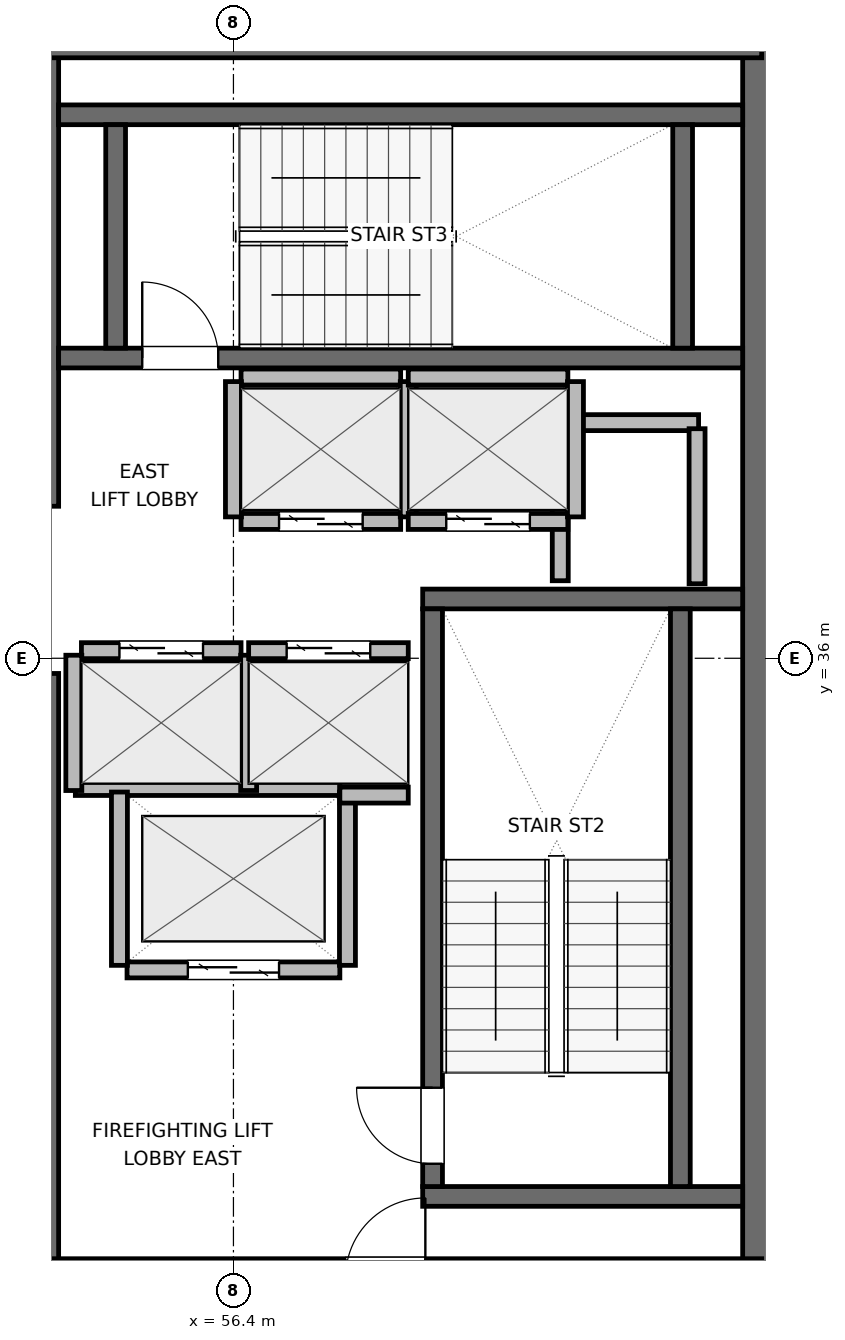
"""IFC4 building model, lengths in metres.
Left out: names, types, materials, properties, quantities, classifications, styles, units other than length and angle.
Written with IfcOpenShell. Run it as: python <this file> out.ifc"""

import sys

from ifc_helpers import new_model, si_unit, direction, frame, frame_2d, origin, place, context, subcontext, project, spatial, rectangle, extrude, element, fill, save


model = new_model("IFC4")
c1 = context("Model", 3, precision=1e-05, world=origin(), true_north=direction((0.0, 1.0)))
c2 = subcontext(c1, "Body", "Model", "MODEL_VIEW")
j1 = project(units=[si_unit("LENGTHUNIT", "METRE"), si_unit("PLANEANGLEUNIT", "RADIAN")], contexts=[c1])
p1 = place(None, origin())
s1 = spatial("IfcSite", under=j1, at=p1, CompositionType="ELEMENT")
p2 = place(p1, origin())
s2 = spatial("IfcBuilding", under=s1, at=p2, CompositionType="ELEMENT")
p3 = place(p2, frame((0.0, 0.0, 274.5)))
s3 = spatial("IfcBuildingStorey", under=s2, at=p3, CompositionType="ELEMENT", Elevation=274.5)
p4 = place(p3, frame((53.85, 27.85, 0.0), z_axis=(0.0, 0.0, 1.0), x_axis=(0.0, 1.0, 0.0)))
e1 = element("IfcWall", 1, at=p4, inside=s3, PredefinedType="SHEAR", context=c2, shape_type="SweptSolid", body=[
    extrude(rectangle(XDim=7.95, YDim=0.5, at=frame_2d((3.975, 0.0))), origin(), (0.0, 0.0, 1.0), 3.9),
])
p5 = place(p3, frame((53.85, 38.0, 0.0), z_axis=(0.0, 0.0, 1.0), x_axis=(0.0, 1.0, 0.0)))
e2 = element("IfcWall", 2, at=p5, inside=s3, PredefinedType="SHEAR", context=c2, shape_type="SweptSolid", body=[
    extrude(rectangle(XDim=6.15, YDim=0.5, at=frame_2d((3.075, 0.0))), origin(), (0.0, 0.0, 1.0), 3.9),
])
p6 = place(p3, frame((63.35, 27.6, 0.0), z_axis=(0.0, 0.0, 1.0), x_axis=(0.0, 1.0, 0.0)))
e3 = element("IfcWall", 3, at=p6, inside=s3, PredefinedType="SHEAR", context=c2, shape_type="SweptSolid", body=[
    extrude(rectangle(XDim=16.8, YDim=0.5, at=frame_2d((8.4, 0.0))), origin(), (0.0, 0.0, 1.0), 3.9),
])
p7 = place(p3, frame((53.85, 27.85, 0.0), z_axis=(0.0, 0.0, 1.0), x_axis=(1.0, 0.0, 0.0)))
e4 = element("IfcWall", 4, at=p7, inside=s3, PredefinedType="SHEAR", context=c2, shape_type="SweptSolid", body=[
    extrude(rectangle(XDim=9.5, YDim=0.5, at=frame_2d((4.75, 0.0))), origin(), (0.0, 0.0, 1.0), 3.9),
])
p8 = place(p7, frame((4.025, 0.0, 0.0)))
e5 = element("IfcOpeningElement", 5, at=p8, cuts=e4, PredefinedType="OPENING", context=c2, shape_type="SweptSolid", body=[
    extrude(rectangle(XDim=1.05, YDim=2.04, at=frame_2d((0.525, 1.02))), frame((0.0, 0.26, 0.0), z_axis=(0.0, -1.0, 0.0), x_axis=(1.0, 0.0, 0.0)), (0.0, 0.0, 1.0), 0.52),
])
p9 = place(p3, frame((53.85, 44.15, 0.0), z_axis=(0.0, 0.0, 1.0), x_axis=(1.0, 0.0, 0.0)))
e6 = element("IfcWall", 6, at=p9, inside=s3, PredefinedType="SHEAR", context=c2, shape_type="SweptSolid", body=[
    extrude(rectangle(XDim=9.5, YDim=0.5, at=frame_2d((4.75, 0.0))), origin(), (0.0, 0.0, 1.0), 3.9),
])
for number, where, z_axis, x_axis in (
    (7, (58.89, 28.92, 0.0), (0.0, 0.0, 1.0), (1.0, 0.0, 0.0)),
    (8, (58.89, 36.78, 0.0), (0.0, 0.0, 1.0), (1.0, 0.0, 0.0)),
):
    element("IfcWall", number, at=place(p3, frame(where, z_axis=z_axis, x_axis=x_axis)), inside=s3, PredefinedType="SHEAR", context=c2, shape_type="SweptSolid", body=[
        extrude(rectangle(XDim=4.21, YDim=0.26, at=frame_2d((2.105, 0.0))), origin(), (0.0, 0.0, 1.0), 3.9),
    ])
p10 = place(p3, frame((59.02, 29.05, 0.0), z_axis=(0.0, 0.0, 1.0), x_axis=(0.0, 1.0, 0.0)))
e9 = element("IfcWall", 9, at=p10, inside=s3, PredefinedType="SHEAR", context=c2, shape_type="SweptSolid", body=[
    extrude(rectangle(XDim=7.6, YDim=0.26, at=frame_2d((3.8, 0.0))), origin(), (0.0, 0.0, 1.0), 3.9),
])
p11 = place(p10, frame((0.3, 0.0, 0.0)))
e10 = element("IfcOpeningElement", 10, at=p11, cuts=e9, PredefinedType="OPENING", context=c2, shape_type="SweptSolid", body=[
    extrude(rectangle(XDim=1.0, YDim=2.04, at=frame_2d((0.5, 1.02))), frame((0.0, 0.14, 0.0), z_axis=(0.0, -1.0, 0.0), x_axis=(1.0, 0.0, 0.0)), (0.0, 0.0, 1.0), 0.28),
])
p12 = place(p3, frame((62.28, 29.05, 0.0), z_axis=(0.0, 0.0, 1.0), x_axis=(0.0, 1.0, 0.0)))
e11 = element("IfcWall", 11, at=p12, inside=s3, PredefinedType="SHEAR", context=c2, shape_type="SweptSolid", body=[
    extrude(rectangle(XDim=7.6, YDim=0.26, at=frame_2d((3.8, 0.0))), origin(), (0.0, 0.0, 1.0), 3.9),
])
p13 = place(p3, frame((54.1, 39.95, 0.0), z_axis=(0.0, 0.0, 1.0), x_axis=(1.0, 0.0, 0.0)))
e12 = element("IfcWall", 12, at=p13, inside=s3, PredefinedType="SHEAR", context=c2, shape_type="SweptSolid", body=[
    extrude(rectangle(XDim=9.0, YDim=0.26, at=frame_2d((4.5, 0.0))), origin(), (0.0, 0.0, 1.0), 3.9),
])
p14 = place(p13, frame((1.1, 0.0, 0.0)))
e13 = element("IfcOpeningElement", 13, at=p14, cuts=e12, PredefinedType="OPENING", context=c2, shape_type="SweptSolid", body=[
    extrude(rectangle(XDim=1.0, YDim=2.04, at=frame_2d((0.5, 1.02))), frame((0.0, 0.14, 0.0), z_axis=(0.0, -1.0, 0.0), x_axis=(1.0, 0.0, 0.0)), (0.0, 0.0, 1.0), 0.28),
])
p15 = place(p3, frame((54.1, 43.15, 0.0), z_axis=(0.0, 0.0, 1.0), x_axis=(1.0, 0.0, 0.0)))
e14 = element("IfcWall", 14, at=p15, inside=s3, PredefinedType="SHEAR", context=c2, shape_type="SweptSolid", body=[
    extrude(rectangle(XDim=9.0, YDim=0.26, at=frame_2d((4.5, 0.0))), origin(), (0.0, 0.0, 1.0), 3.9),
])
for number, where, z_axis, x_axis in (
    (15, (54.85, 40.08, 0.0), (0.0, 0.0, 1.0), (0.0, 1.0, 0.0)),
    (16, (62.31, 40.08, 0.0), (0.0, 0.0, 1.0), (0.0, 1.0, 0.0)),
):
    element("IfcWall", number, at=place(p3, frame(where, z_axis=z_axis, x_axis=x_axis)), inside=s3, PredefinedType="SHEAR", context=c2, shape_type="SweptSolid", body=[
        extrude(rectangle(XDim=2.94, YDim=0.26, at=frame_2d((1.47, 0.0))), origin(), (0.0, 0.0, 1.0), 3.9),
    ])
p16 = place(p3, frame((60.72, 39.1, 0.0), z_axis=(0.0, 0.0, 1.0), x_axis=(1.0, 0.0, 0.0)))
e17 = element("IfcWall", 17, at=p16, inside=s3, PredefinedType="PARTITIONING", context=c2, shape_type="SweptSolid", body=[
    extrude(rectangle(XDim=1.8, YDim=0.21, at=frame_2d((0.9, 0.0))), origin(), (0.0, 0.0, 1.0), 3.68),
])
p17 = place(p3, frame((60.7, 37.02, 0.0), z_axis=(0.0, 0.0, 1.0), x_axis=(0.0, 1.0, 0.0)))
e18 = element("IfcWall", 18, at=p17, inside=s3, PredefinedType="PARTITIONING", context=c2, shape_type="SweptSolid", body=[
    extrude(rectangle(XDim=1.96, YDim=0.21, at=frame_2d((0.98, 0.0))), origin(), (0.0, 0.0, 1.0), 3.68),
])
p18 = place(p3, frame((62.5, 36.98, 0.0), z_axis=(0.0, 0.0, 1.0), x_axis=(0.0, 1.0, 0.0)))
e19 = element("IfcWall", 19, at=p18, inside=s3, PredefinedType="PARTITIONING", context=c2, shape_type="SweptSolid", body=[
    extrude(rectangle(XDim=2.04, YDim=0.21, at=frame_2d((1.02, 0.0))), origin(), (0.0, 0.0, 1.0), 3.68),
])
p19 = place(p3, frame((55.0, 31.9, 0.0), z_axis=(0.0, 0.0, 1.0), x_axis=(1.0, 0.0, 0.0)))
e20 = element("IfcWall", 20, at=p19, inside=s3, PredefinedType="PARTITIONING", context=c2, shape_type="SweptSolid", body=[
    extrude(rectangle(XDim=2.8, YDim=0.21, at=frame_2d((1.4, 0.0))), origin(), (0.0, 0.0, 1.0), 3.68),
])
p20 = place(p19, frame((0.8, 0.0, 0.0)))
e21 = element("IfcOpeningElement", 21, at=p20, cuts=e20, PredefinedType="OPENING", context=c2, shape_type="SweptSolid", body=[
    extrude(rectangle(XDim=1.2, YDim=2.04, at=frame_2d((0.6, 1.02))), frame((0.0, 0.115, 0.0), z_axis=(0.0, -1.0, 0.0), x_axis=(1.0, 0.0, 0.0)), (0.0, 0.0, 1.0), 0.23),
])
p21 = place(p3, frame((54.32, 34.3, 0.0), z_axis=(0.0, 0.0, 1.0), x_axis=(1.0, 0.0, 0.0)))
e22 = element("IfcWall", 22, at=p21, inside=s3, PredefinedType="PARTITIONING", context=c2, shape_type="SweptSolid", body=[
    extrude(rectangle(XDim=3.48, YDim=0.21, at=frame_2d((1.74, 0.0))), origin(), (0.0, 0.0, 1.0), 3.68),
])
for number, where, z_axis, x_axis in (
    (23, (54.9, 31.96, 0.0), (0.0, 0.0, 1.0), (0.0, 1.0, 0.0)),
    (24, (57.9, 31.96, 0.0), (0.0, 0.0, 1.0), (0.0, 1.0, 0.0)),
):
    element("IfcWall", number, at=place(p3, frame(where, z_axis=z_axis, x_axis=x_axis)), inside=s3, PredefinedType="PARTITIONING", context=c2, shape_type="SweptSolid", body=[
        extrude(rectangle(XDim=2.28, YDim=0.21, at=frame_2d((1.14, 0.0))), origin(), (0.0, 0.0, 1.0), 3.68),
    ])
p22 = place(p3, frame((54.4, 36.1, 0.0), z_axis=(0.0, 0.0, 1.0), x_axis=(1.0, 0.0, 0.0)))
e25 = element("IfcWall", 25, at=p22, inside=s3, PredefinedType="PARTITIONING", context=c2, shape_type="SweptSolid", body=[
    extrude(rectangle(XDim=2.1, YDim=0.21, at=frame_2d((1.05, 0.0))), origin(), (0.0, 0.0, 1.0), 3.68),
])
p23 = place(p22, frame((0.5, 0.0, 0.0)))
e26 = element("IfcOpeningElement", 26, at=p23, cuts=e25, PredefinedType="OPENING", context=c2, shape_type="SweptSolid", body=[
    extrude(rectangle(XDim=1.1, YDim=2.04, at=frame_2d((0.55, 1.02))), frame((0.0, 0.115, 0.0), z_axis=(0.0, -1.0, 0.0), x_axis=(1.0, 0.0, 0.0)), (0.0, 0.0, 1.0), 0.23),
])
for number, where, z_axis, x_axis in (
    (27, (54.3, 34.26, 0.0), (0.0, 0.0, 1.0), (0.0, 1.0, 0.0)),
    (28, (56.6, 34.26, 0.0), (0.0, 0.0, 1.0), (0.0, 1.0, 0.0)),
):
    element("IfcWall", number, at=place(p3, frame(where, z_axis=z_axis, x_axis=x_axis)), inside=s3, PredefinedType="PARTITIONING", context=c2, shape_type="SweptSolid", body=[
        extrude(rectangle(XDim=1.78, YDim=0.21, at=frame_2d((0.89, 0.0))), origin(), (0.0, 0.0, 1.0), 3.68),
    ])
p24 = place(p3, frame((56.6, 36.1, 0.0), z_axis=(0.0, 0.0, 1.0), x_axis=(1.0, 0.0, 0.0)))
e29 = element("IfcWall", 29, at=p24, inside=s3, PredefinedType="PARTITIONING", context=c2, shape_type="SweptSolid", body=[
    extrude(rectangle(XDim=2.1, YDim=0.21, at=frame_2d((1.05, 0.0))), origin(), (0.0, 0.0, 1.0), 3.68),
])
p25 = place(p24, frame((0.5, 0.0, 0.0)))
e30 = element("IfcOpeningElement", 30, at=p25, cuts=e29, PredefinedType="OPENING", context=c2, shape_type="SweptSolid", body=[
    extrude(rectangle(XDim=1.1, YDim=2.04, at=frame_2d((0.55, 1.02))), frame((0.0, 0.115, 0.0), z_axis=(0.0, -1.0, 0.0), x_axis=(1.0, 0.0, 0.0)), (0.0, 0.0, 1.0), 0.23),
])
p26 = place(p3, frame((57.8, 34.2, 0.0), z_axis=(0.0, 0.0, 1.0), x_axis=(1.0, 0.0, 0.0)))
e31 = element("IfcWall", 31, at=p26, inside=s3, PredefinedType="PARTITIONING", context=c2, shape_type="SweptSolid", body=[
    extrude(rectangle(XDim=0.9, YDim=0.21, at=frame_2d((0.45, 0.0))), origin(), (0.0, 0.0, 1.0), 3.68),
])
p27 = place(p3, frame((56.5, 37.8, 0.0), z_axis=(0.0, 0.0, 1.0), x_axis=(1.0, 0.0, 0.0)))
e32 = element("IfcWall", 32, at=p27, inside=s3, PredefinedType="PARTITIONING", context=c2, shape_type="SweptSolid", body=[
    extrude(rectangle(XDim=2.1, YDim=0.21, at=frame_2d((1.05, 0.0))), origin(), (0.0, 0.0, 1.0), 3.68),
])
p28 = place(p27, frame((0.5, 0.0, 0.0)))
e33 = element("IfcOpeningElement", 33, at=p28, cuts=e32, PredefinedType="OPENING", context=c2, shape_type="SweptSolid", body=[
    extrude(rectangle(XDim=1.1, YDim=2.04, at=frame_2d((0.55, 1.02))), frame((0.0, 0.115, 0.0), z_axis=(0.0, -1.0, 0.0), x_axis=(1.0, 0.0, 0.0)), (0.0, 0.0, 1.0), 0.23),
])
p29 = place(p3, frame((56.5, 39.7, 0.0), z_axis=(0.0, 0.0, 1.0), x_axis=(1.0, 0.0, 0.0)))
e34 = element("IfcWall", 34, at=p29, inside=s3, PredefinedType="PARTITIONING", context=c2, shape_type="SweptSolid", body=[
    extrude(rectangle(XDim=2.1, YDim=0.21, at=frame_2d((1.05, 0.0))), origin(), (0.0, 0.0, 1.0), 3.68),
])
for number, where, z_axis, x_axis in (
    (35, (56.4, 37.86, 0.0), (0.0, 0.0, 1.0), (0.0, 1.0, 0.0)),
    (36, (58.7, 37.86, 0.0), (0.0, 0.0, 1.0), (0.0, 1.0, 0.0)),
):
    element("IfcWall", number, at=place(p3, frame(where, z_axis=z_axis, x_axis=x_axis)), inside=s3, PredefinedType="PARTITIONING", context=c2, shape_type="SweptSolid", body=[
        extrude(rectangle(XDim=1.78, YDim=0.21, at=frame_2d((0.89, 0.0))), origin(), (0.0, 0.0, 1.0), 3.68),
    ])
p30 = place(p3, frame((58.7, 37.8, 0.0), z_axis=(0.0, 0.0, 1.0), x_axis=(1.0, 0.0, 0.0)))
e37 = element("IfcWall", 37, at=p30, inside=s3, PredefinedType="PARTITIONING", context=c2, shape_type="SweptSolid", body=[
    extrude(rectangle(XDim=2.1, YDim=0.21, at=frame_2d((1.05, 0.0))), origin(), (0.0, 0.0, 1.0), 3.68),
])
p31 = place(p30, frame((0.5, 0.0, 0.0)))
e38 = element("IfcOpeningElement", 38, at=p31, cuts=e37, PredefinedType="OPENING", context=c2, shape_type="SweptSolid", body=[
    extrude(rectangle(XDim=1.1, YDim=2.04, at=frame_2d((0.55, 1.02))), frame((0.0, 0.115, 0.0), z_axis=(0.0, -1.0, 0.0), x_axis=(1.0, 0.0, 0.0)), (0.0, 0.0, 1.0), 0.23),
])
p32 = place(p3, frame((58.7, 39.7, 0.0), z_axis=(0.0, 0.0, 1.0), x_axis=(1.0, 0.0, 0.0)))
e39 = element("IfcWall", 39, at=p32, inside=s3, PredefinedType="PARTITIONING", context=c2, shape_type="SweptSolid", body=[
    extrude(rectangle(XDim=2.1, YDim=0.21, at=frame_2d((1.05, 0.0))), origin(), (0.0, 0.0, 1.0), 3.68),
])
p33 = place(p3, frame((60.9, 37.86, 0.0), z_axis=(0.0, 0.0, 1.0), x_axis=(0.0, 1.0, 0.0)))
e40 = element("IfcWall", 40, at=p33, inside=s3, PredefinedType="PARTITIONING", context=c2, shape_type="SweptSolid", body=[
    extrude(rectangle(XDim=1.78, YDim=0.21, at=frame_2d((0.89, 0.0))), origin(), (0.0, 0.0, 1.0), 3.68),
])
p34 = place(p11, origin())
e41 = element("IfcDoor", 41, at=p34, inside=s3, OperationType="SINGLE_SWING_RIGHT", PredefinedType="DOOR", context=c2, shape_type="SweptSolid", body=[
    extrude(rectangle(XDim=1.0, YDim=2.04, at=frame_2d((0.5, 1.02))), frame((0.0, 0.025, 0.0), z_axis=(0.0, -1.0, 0.0), x_axis=(1.0, 0.0, 0.0)), (0.0, 0.0, 1.0), 0.05),
])
fill(e10, e41)
p35 = place(p14, origin())
e42 = element("IfcDoor", 42, at=p35, inside=s3, OperationType="SINGLE_SWING_LEFT", PredefinedType="DOOR", context=c2, shape_type="SweptSolid", body=[
    extrude(rectangle(XDim=1.0, YDim=2.04, at=frame_2d((0.5, 1.02))), frame((0.0, 0.025, 0.0), z_axis=(0.0, -1.0, 0.0), x_axis=(1.0, 0.0, 0.0)), (0.0, 0.0, 1.0), 0.05),
])
fill(e13, e42)
p36 = place(p20, origin())
e43 = element("IfcDoor", 43, at=p36, inside=s3, OperationType="DOUBLE_DOOR_SLIDING", PredefinedType="DOOR", context=c2, shape_type="SweptSolid", body=[
    extrude(rectangle(XDim=1.2, YDim=2.04, at=frame_2d((0.6, 1.02))), frame((0.0, 0.025, 0.0), z_axis=(0.0, -1.0, 0.0), x_axis=(1.0, 0.0, 0.0)), (0.0, 0.0, 1.0), 0.05),
])
fill(e21, e43)
p37 = place(p23, origin())
e44 = element("IfcDoor", 44, at=p37, inside=s3, OperationType="DOUBLE_DOOR_SLIDING", PredefinedType="DOOR", context=c2, shape_type="SweptSolid", body=[
    extrude(rectangle(XDim=1.1, YDim=2.04, at=frame_2d((0.55, 1.02))), frame((0.0, 0.025, 0.0), z_axis=(0.0, -1.0, 0.0), x_axis=(1.0, 0.0, 0.0)), (0.0, 0.0, 1.0), 0.05),
])
fill(e26, e44)
p38 = place(p25, origin())
e45 = element("IfcDoor", 45, at=p38, inside=s3, OperationType="DOUBLE_DOOR_SLIDING", PredefinedType="DOOR", context=c2, shape_type="SweptSolid", body=[
    extrude(rectangle(XDim=1.1, YDim=2.04, at=frame_2d((0.55, 1.02))), frame((0.0, 0.025, 0.0), z_axis=(0.0, -1.0, 0.0), x_axis=(1.0, 0.0, 0.0)), (0.0, 0.0, 1.0), 0.05),
])
fill(e30, e45)
p39 = place(p28, origin())
e46 = element("IfcDoor", 46, at=p39, inside=s3, OperationType="DOUBLE_DOOR_SLIDING", PredefinedType="DOOR", context=c2, shape_type="SweptSolid", body=[
    extrude(rectangle(XDim=1.1, YDim=2.04, at=frame_2d((0.55, 1.02))), frame((0.0, 0.025, 0.0), z_axis=(0.0, -1.0, 0.0), x_axis=(1.0, 0.0, 0.0)), (0.0, 0.0, 1.0), 0.05),
])
fill(e33, e46)
p40 = place(p31, origin())
e47 = element("IfcDoor", 47, at=p40, inside=s3, OperationType="DOUBLE_DOOR_SLIDING", PredefinedType="DOOR", context=c2, shape_type="SweptSolid", body=[
    extrude(rectangle(XDim=1.1, YDim=2.04, at=frame_2d((0.55, 1.02))), frame((0.0, 0.025, 0.0), z_axis=(0.0, -1.0, 0.0), x_axis=(1.0, 0.0, 0.0)), (0.0, 0.0, 1.0), 0.05),
])
fill(e38, e47)
save(model, sys.argv[1])
